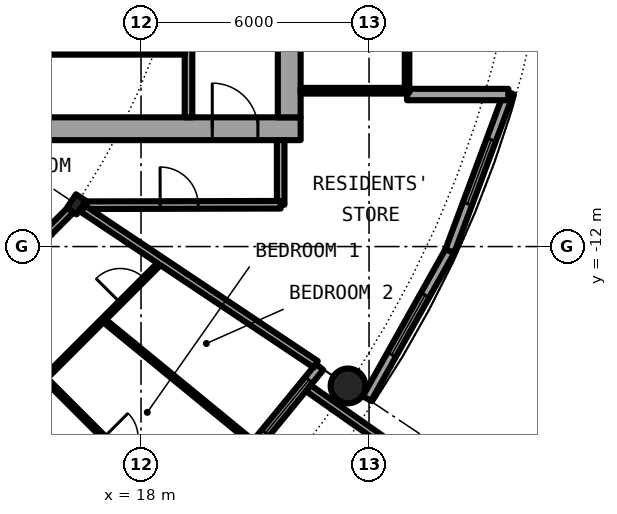
"""IFC4 building model, lengths in metres.
Left out: names, types, materials, properties, quantities, classifications, styles, units other than length and angle.
Written with IfcOpenShell. Run it as: python <this file> out.ifc"""

import sys

from ifc_helpers import new_model, si_unit, direction, frame, frame_2d, origin, origin_2d, place, context, subcontext, project, spatial, rectangle, hollow_circle, i_section, extrude, element, fill, save


model = new_model("IFC4")
c1 = context("Model", 3, precision=1e-05, world=origin(), true_north=direction((0.0, 1.0)))
c2 = subcontext(c1, "Body", "Model", "MODEL_VIEW")
j1 = project(units=[si_unit("LENGTHUNIT", "METRE"), si_unit("PLANEANGLEUNIT", "RADIAN")], contexts=[c1])
p1 = place(None, origin())
s1 = spatial("IfcSite", under=j1, at=p1, CompositionType="ELEMENT")
p2 = place(p1, origin())
s2 = spatial("IfcBuilding", under=s1, at=p2, CompositionType="ELEMENT")
p3 = place(p2, frame((0.0, 0.0, 123.85)))
s3 = spatial("IfcBuildingStorey", under=s2, at=p3, CompositionType="ELEMENT", Elevation=123.85)
p4 = place(p3, frame((23.448, -15.667, 0.0), z_axis=(0.0, 0.0, 1.0), x_axis=(1.0, 0.0, 0.0)))
e1 = element("IfcColumn", 1, at=p4, inside=s3, PredefinedType="COLUMN", context=c2, shape_type="SweptSolid", body=[
    extrude(hollow_circle(Radius=0.457, WallThickness=0.04, at=origin_2d()), origin(), (0.0, 0.0, 1.0), 3.05),
])
p5 = place(p3, frame((16.297, -10.889, 0.0), z_axis=(0.0, 0.0, 1.0), x_axis=(0.831469612303, -0.55557023302, 0.0)))
e2 = element("IfcColumn", 2, at=p5, inside=s3, PredefinedType="COLUMN", context=c2, shape_type="SweptSolid", body=[
    extrude(i_section(OverallWidth=0.307, OverallDepth=0.432, WebThickness=0.021, FlangeThickness=0.04, FilletRadius=0.027, at=origin_2d()), origin(), (0.0, 0.0, 1.0), 3.05),
])
p6 = place(p3, frame((19.304, -19.304, 0.0), z_axis=(0.0, 0.0, 1.0), x_axis=(0.634382322723, 0.773019449054, 0.0)))
e3 = element("IfcWall", 3, at=p6, inside=s3, PredefinedType="SOLIDWALL", context=c2, shape_type="SweptSolid", body=[
    extrude(rectangle(XDim=5.352, YDim=0.25, at=frame_2d((2.676, 0.0))), origin(), (0.0, 0.0, 1.0), 2.7),
])
p7 = place(p6, frame((0.841, 0.0, 0.0)))
e4 = element("IfcOpeningElement", 4, at=p7, cuts=e3, PredefinedType="OPENING", context=c2, shape_type="SweptSolid", body=[
    extrude(rectangle(XDim=1.0, YDim=2.2, at=frame_2d((0.5, 1.1))), frame((0.0, 0.135, 0.0), z_axis=(0.0, -1.0, 0.0), x_axis=(1.0, 0.0, 0.0)), (0.0, 0.0, 1.0), 0.27),
])
p8 = place(p6, frame((3.111, 0.0, 0.3)))
e5 = element("IfcOpeningElement", 5, at=p8, cuts=e3, PredefinedType="OPENING", context=c2, shape_type="SweptSolid", body=[
    extrude(rectangle(XDim=1.8, YDim=2.1, at=frame_2d((0.9, 1.05))), frame((0.0, 0.135, 0.0), z_axis=(0.0, -1.0, 0.0), x_axis=(1.0, 0.0, 0.0)), (0.0, 0.0, 1.0), 0.27),
])
p9 = place(p3, frame((22.402, -15.726, -0.03), z_axis=(0.0, 0.0, 1.0), x_axis=(0.818275399393, -0.574826383135, 0.0)))
e6 = element("IfcWall", 6, at=p9, inside=s3, PredefinedType="SOLIDWALL", context=c2, shape_type="SweptSolid", body=[
    extrude(rectangle(XDim=2.929, YDim=0.2, at=frame_2d((1.465, 0.0))), origin(), (0.0, 0.0, 1.0), 2.73),
])
p10 = place(p3, frame((23.946, -16.0, 0.0), z_axis=(0.0, 0.0, 1.0), x_axis=(0.489696356642, 0.871893042919, 0.0)))
e7 = element("IfcWall", 7, at=p10, inside=s3, PredefinedType="SOLIDWALL", context=c2, shape_type="SweptSolid", body=[
    extrude(rectangle(XDim=4.454, YDim=0.25, at=frame_2d((2.227, 0.0))), origin(), (0.0, 0.0, 1.0), 2.7),
])
p11 = place(p10, frame((1.327, 0.0, 0.3)))
e8 = element("IfcOpeningElement", 8, at=p11, cuts=e7, PredefinedType="OPENING", context=c2, shape_type="SweptSolid", body=[
    extrude(rectangle(XDim=1.8, YDim=2.1, at=frame_2d((0.9, 1.05))), frame((0.0, 0.135, 0.0), z_axis=(0.0, -1.0, 0.0), x_axis=(1.0, 0.0, 0.0)), (0.0, 0.0, 1.0), 0.27),
])
p12 = place(p3, frame((26.127, -12.117, 0.0), z_axis=(0.0, 0.0, 1.0), x_axis=(0.349247811493, 0.937030397675, 0.0)))
e9 = element("IfcWall", 9, at=p12, inside=s3, PredefinedType="SOLIDWALL", context=c2, shape_type="SweptSolid", body=[
    extrude(rectangle(XDim=4.452, YDim=0.25, at=frame_2d((2.226, 0.0))), origin(), (0.0, 0.0, 1.0), 2.7),
])
p13 = place(p12, frame((1.327, 0.0, 0.3)))
e10 = element("IfcOpeningElement", 10, at=p13, cuts=e9, PredefinedType="OPENING", context=c2, shape_type="SweptSolid", body=[
    extrude(rectangle(XDim=1.8, YDim=2.1, at=frame_2d((0.9, 1.05))), frame((0.0, 0.135, 0.0), z_axis=(0.0, -1.0, 0.0), x_axis=(1.0, 0.0, 0.0)), (0.0, 0.0, 1.0), 0.27),
])
p14 = place(p3, frame((25.0, -8.0, 0.0), z_axis=(0.0, 0.0, 1.0), x_axis=(1.0, 0.0, 0.0)))
e11 = element("IfcWall", 11, at=p14, inside=s3, PredefinedType="SOLIDWALL", context=c2, shape_type="SweptSolid", body=[
    extrude(rectangle(XDim=2.667, YDim=0.3, at=frame_2d((1.333, 0.0))), origin(), (0.0, 0.0, 1.0), 2.7),
])
p15 = place(p3, frame((8.4, -8.9, 0.0), z_axis=(0.0, 0.0, 1.0), x_axis=(1.0, 0.0, 0.0)))
e12 = element("IfcWall", 12, at=p15, inside=s3, PredefinedType="SHEAR", context=c2, shape_type="SweptSolid", body=[
    extrude(rectangle(XDim=13.8, YDim=0.6, at=frame_2d((6.9, 0.0))), origin(), (0.0, 0.0, 1.0), 3.05),
])
p16 = place(p15, frame((11.475, 0.0, 0.0)))
e13 = element("IfcOpeningElement", 13, at=p16, cuts=e12, PredefinedType="OPENING", context=c2, shape_type="SweptSolid", body=[
    extrude(rectangle(XDim=1.2, YDim=2.3, at=frame_2d((0.6, 1.15))), frame((0.0, 0.31, 0.0), z_axis=(0.0, -1.0, 0.0), x_axis=(1.0, 0.0, 0.0)), (0.0, 0.0, 1.0), 0.62),
])
p17 = place(p3, frame((21.9, 8.6, 0.0), z_axis=(0.0, 0.0, 1.0), x_axis=(0.0, -1.0, 0.0)))
e14 = element("IfcWall", 14, at=p17, inside=s3, PredefinedType="SHEAR", context=c2, shape_type="SweptSolid", body=[
    extrude(rectangle(XDim=17.2, YDim=0.6, at=frame_2d((8.6, 0.0))), origin(), (0.0, 0.0, 1.0), 3.05),
])
p18 = place(p17, frame((7.7, 0.0, 0.0)))
e15 = element("IfcOpeningElement", 15, at=p18, cuts=e14, PredefinedType="OPENING", context=c2, shape_type="SweptSolid", body=[
    extrude(rectangle(XDim=1.8, YDim=2.3, at=frame_2d((0.9, 1.15))), frame((0.0, 0.31, 0.0), z_axis=(0.0, -1.0, 0.0), x_axis=(1.0, 0.0, 0.0)), (0.0, 0.0, 1.0), 0.62),
])
p19 = place(p3, frame((19.25, -8.6, 0.0), z_axis=(0.0, 0.0, 1.0), x_axis=(0.0, 1.0, 0.0)))
e16 = element("IfcWall", 16, at=p19, inside=s3, PredefinedType="SOLIDWALL", context=c2, shape_type="SweptSolid", body=[
    extrude(rectangle(XDim=7.025, YDim=0.2, at=frame_2d((3.513, 0.0))), origin(), (0.0, 0.0, 1.0), 2.7),
])
p20 = place(p19, frame((2.35, 0.0, 0.0)))
e17 = element("IfcOpeningElement", 17, at=p20, cuts=e16, PredefinedType="OPENING", context=c2, shape_type="SweptSolid", body=[
    extrude(rectangle(XDim=1.1, YDim=2.3, at=frame_2d((0.55, 1.15))), frame((0.0, 0.11, 0.0), z_axis=(0.0, -1.0, 0.0), x_axis=(1.0, 0.0, 0.0)), (0.0, 0.0, 1.0), 0.22),
])
p21 = place(p3, frame((15.45, -6.875, 0.0), z_axis=(0.0, 0.0, 1.0), x_axis=(1.0, 0.0, 0.0)))
e18 = element("IfcWall", 18, at=p21, inside=s3, PredefinedType="PARTITIONING", context=c2, shape_type="SweptSolid", body=[
    extrude(rectangle(XDim=3.7, YDim=0.15, at=frame_2d((1.85, 0.0))), origin(), (0.0, 0.0, 1.0), 2.7),
])
p22 = place(p21, frame((1.4, 0.0, 0.0)))
e19 = element("IfcOpeningElement", 19, at=p22, cuts=e18, PredefinedType="OPENING", context=c2, shape_type="SweptSolid", body=[
    extrude(rectangle(XDim=0.9, YDim=2.3, at=frame_2d((0.45, 1.15))), frame((0.0, 0.085, 0.0), z_axis=(0.0, -1.0, 0.0), x_axis=(1.0, 0.0, 0.0)), (0.0, 0.0, 1.0), 0.17),
])
p23 = place(p3, frame((22.2, -7.9, 0.0), z_axis=(0.0, 0.0, 1.0), x_axis=(1.0, 0.0, 0.0)))
e20 = element("IfcWall", 20, at=p23, inside=s3, PredefinedType="PARTITIONING", context=c2, shape_type="SweptSolid", body=[
    extrude(rectangle(XDim=2.74, YDim=0.15, at=frame_2d((1.37, 0.0))), origin(), (0.0, 0.0, 1.0), 2.7),
])
p24 = place(p3, frame((25.0, -7.95, 0.0), z_axis=(0.0, 0.0, 1.0), x_axis=(0.0, 1.0, 0.0)))
e21 = element("IfcWall", 21, at=p24, inside=s3, PredefinedType="PARTITIONING", context=c2, shape_type="SweptSolid", body=[
    extrude(rectangle(XDim=15.9, YDim=0.12, at=frame_2d((7.95, 0.0))), origin(), (0.0, 0.0, 1.0), 2.7),
])
p25 = place(p24, frame((0.95, 0.0, 0.1)))
e22 = element("IfcOpeningElement", 22, at=p25, cuts=e21, PredefinedType="OPENING", context=c2, shape_type="SweptSolid", body=[
    extrude(rectangle(XDim=14.0, YDim=2.35, at=frame_2d((7.0, 1.175))), frame((0.0, 0.07, 0.0), z_axis=(0.0, -1.0, 0.0), x_axis=(1.0, 0.0, 0.0)), (0.0, 0.0, 1.0), 0.14),
])
p26 = place(p3, frame((15.468, -15.463, 0.0), z_axis=(0.0, 0.0, 1.0), x_axis=(0.707106781187, 0.707106781187, 0.0)))
e23 = element("IfcWall", 23, at=p26, inside=s3, PredefinedType="PARTITIONING", context=c2, shape_type="SweptSolid", body=[
    extrude(rectangle(XDim=4.351, YDim=0.1, at=frame_2d((2.176, 0.0))), origin(), (0.0, 0.0, 1.0), 2.7),
])
p27 = place(p26, frame((2.808, 0.0, 0.0)))
e24 = element("IfcOpeningElement", 24, at=p27, cuts=e23, PredefinedType="OPENING", context=c2, shape_type="SweptSolid", body=[
    extrude(rectangle(XDim=0.9, YDim=2.3, at=frame_2d((0.45, 1.15))), frame((0.0, 0.06, 0.0), z_axis=(0.0, -1.0, 0.0), x_axis=(1.0, 0.0, 0.0)), (0.0, 0.0, 1.0), 0.12),
])
p28 = place(p3, frame((21.675, -10.9, 0.0), z_axis=(0.0, 0.0, 1.0), x_axis=(0.0, 1.0, 0.0)))
e25 = element("IfcWall", 25, at=p28, inside=s3, PredefinedType="PARTITIONING", context=c2, shape_type="SweptSolid", body=[
    extrude(rectangle(XDim=1.7, YDim=0.2, at=frame_2d((0.85, 0.0))), origin(), (0.0, 0.0, 1.0), 2.7),
])
p29 = place(p3, frame((11.0, -16.186, 0.0), z_axis=(0.0, 0.0, 1.0), x_axis=(0.707106781187, 0.707106781187, 0.0)))
e26 = element("IfcWall", 26, at=p29, inside=s3, PredefinedType="PARTITIONING", context=c2, shape_type="SweptSolid", body=[
    extrude(rectangle(XDim=7.334, YDim=0.2, at=frame_2d((3.667, 0.0))), origin(), (0.0, 0.0, 1.0), 2.39),
])
p30 = place(p29, frame((4.123, 0.0, 0.0)))
e27 = element("IfcOpeningElement", 27, at=p30, cuts=e26, PredefinedType="OPENING", context=c2, shape_type="SweptSolid", body=[
    extrude(rectangle(XDim=1.0, YDim=2.3, at=frame_2d((0.5, 1.15))), frame((0.0, 0.11, 0.0), z_axis=(0.0, -1.0, 0.0), x_axis=(1.0, 0.0, 0.0)), (0.0, 0.0, 1.0), 0.22),
])
p31 = place(p3, frame((16.541, -10.912, 0.0), z_axis=(0.0, 0.0, 1.0), x_axis=(0.999997173357, 0.002377662213, 0.0)))
e28 = element("IfcWall", 28, at=p31, inside=s3, PredefinedType="PARTITIONING", context=c2, shape_type="SweptSolid", body=[
    extrude(rectangle(XDim=5.134, YDim=0.2, at=frame_2d((2.567, 0.0))), origin(), (0.0, 0.0, 1.0), 2.7),
])
p32 = place(p31, frame((1.963, 0.0, 0.0)))
e29 = element("IfcOpeningElement", 29, at=p32, cuts=e28, PredefinedType="OPENING", context=c2, shape_type="SweptSolid", body=[
    extrude(rectangle(XDim=1.0, YDim=2.3, at=frame_2d((0.5, 1.15))), frame((0.0, 0.11, 0.0), z_axis=(0.0, -1.0, 0.0), x_axis=(1.0, 0.0, 0.0)), (0.0, 0.0, 1.0), 0.22),
])
p33 = place(p3, frame((15.465, -15.465, 0.0), z_axis=(0.0, 0.0, 1.0), x_axis=(0.707106781187, -0.707106781187, 0.0)))
e30 = element("IfcWall", 30, at=p33, inside=s3, PredefinedType="PARTITIONING", context=c2, shape_type="SweptSolid", body=[
    extrude(rectangle(XDim=5.305, YDim=0.1, at=frame_2d((2.652, 0.0))), origin(), (0.0, 0.0, 1.0), 2.7),
])
p34 = place(p33, frame((2.202, 0.0, 0.0)))
e31 = element("IfcOpeningElement", 31, at=p34, cuts=e30, PredefinedType="OPENING", context=c2, shape_type="SweptSolid", body=[
    extrude(rectangle(XDim=0.9, YDim=2.3, at=frame_2d((0.45, 1.15))), frame((0.0, 0.06, 0.0), z_axis=(0.0, -1.0, 0.0), x_axis=(1.0, 0.0, 0.0)), (0.0, 0.0, 1.0), 0.12),
])
p35 = place(p3, frame((16.477, -11.009, 0.0), z_axis=(0.0, 0.0, 1.0), x_axis=(0.831467903109, -0.555572791, 0.0)))
e32 = element("IfcWall", 32, at=p35, inside=s3, PredefinedType="PARTITIONING", context=c2, shape_type="SweptSolid", body=[
    extrude(rectangle(XDim=7.358, YDim=0.2, at=frame_2d((3.679, 0.0))), origin(), (0.0, 0.0, 1.0), 2.7),
])
p36 = place(p3, frame((17.004, -13.927, 0.0), z_axis=(0.0, 0.0, 1.0), x_axis=(0.773517471898, -0.633774976367, 0.0)))
e33 = element("IfcWall", 33, at=p36, inside=s3, PredefinedType="PARTITIONING", context=c2, shape_type="SweptSolid", body=[
    extrude(rectangle(XDim=5.196, YDim=0.1, at=frame_2d((2.598, 0.0))), origin(), (0.0, 0.0, 1.0), 2.7),
])
p37 = place(p8, origin())
e34 = element("IfcWindow", 34, at=p37, inside=s3, PartitioningType="SINGLE_PANEL", PredefinedType="WINDOW", context=c2, shape_type="SweptSolid", body=[
    extrude(rectangle(XDim=1.8, YDim=2.1, at=frame_2d((0.9, 1.05))), frame((0.0, 0.03, 0.0), z_axis=(0.0, -1.0, 0.0), x_axis=(1.0, 0.0, 0.0)), (0.0, 0.0, 1.0), 0.06),
])
fill(e5, e34)
p38 = place(p11, origin())
e35 = element("IfcWindow", 35, at=p38, inside=s3, PartitioningType="SINGLE_PANEL", PredefinedType="WINDOW", context=c2, shape_type="SweptSolid", body=[
    extrude(rectangle(XDim=1.8, YDim=2.1, at=frame_2d((0.9, 1.05))), frame((0.0, 0.03, 0.0), z_axis=(0.0, -1.0, 0.0), x_axis=(1.0, 0.0, 0.0)), (0.0, 0.0, 1.0), 0.06),
])
fill(e8, e35)
p39 = place(p13, origin())
e36 = element("IfcWindow", 36, at=p39, inside=s3, PartitioningType="SINGLE_PANEL", PredefinedType="WINDOW", context=c2, shape_type="SweptSolid", body=[
    extrude(rectangle(XDim=1.8, YDim=2.1, at=frame_2d((0.9, 1.05))), frame((0.0, 0.03, 0.0), z_axis=(0.0, -1.0, 0.0), x_axis=(1.0, 0.0, 0.0)), (0.0, 0.0, 1.0), 0.06),
])
fill(e10, e36)
p40 = place(p22, origin())
e37 = element("IfcDoor", 37, at=p40, inside=s3, OperationType="SINGLE_SWING_LEFT", PredefinedType="DOOR", context=c2, shape_type="SweptSolid", body=[
    extrude(rectangle(XDim=0.9, YDim=2.3, at=frame_2d((0.45, 1.15))), frame((0.0, 0.025, 0.0), z_axis=(0.0, -1.0, 0.0), x_axis=(1.0, 0.0, 0.0)), (0.0, 0.0, 1.0), 0.05),
])
fill(e19, e37)
p41 = place(p16, origin())
e38 = element("IfcDoor", 38, at=p41, inside=s3, OperationType="SINGLE_SWING_LEFT", PredefinedType="DOOR", context=c2, shape_type="SweptSolid", body=[
    extrude(rectangle(XDim=1.2, YDim=2.3, at=frame_2d((0.6, 1.15))), frame((0.0, 0.025, 0.0), z_axis=(0.0, -1.0, 0.0), x_axis=(1.0, 0.0, 0.0)), (0.0, 0.0, 1.0), 0.05),
])
fill(e13, e38)
p42 = place(p25, origin())
e39 = element("IfcWindow", 39, at=p42, inside=s3, PartitioningType="SINGLE_PANEL", PredefinedType="WINDOW", context=c2, shape_type="SweptSolid", body=[
    extrude(rectangle(XDim=14.0, YDim=2.35, at=frame_2d((7.0, 1.175))), frame((0.0, 0.03, 0.0), z_axis=(0.0, -1.0, 0.0), x_axis=(1.0, 0.0, 0.0)), (0.0, 0.0, 1.0), 0.06),
])
fill(e22, e39)
p43 = place(p27, origin())
e40 = element("IfcDoor", 40, at=p43, inside=s3, OperationType="SINGLE_SWING_RIGHT", PredefinedType="DOOR", context=c2, shape_type="SweptSolid", body=[
    extrude(rectangle(XDim=0.9, YDim=2.3, at=frame_2d((0.45, 1.15))), frame((0.0, 0.025, 0.0), z_axis=(0.0, -1.0, 0.0), x_axis=(1.0, 0.0, 0.0)), (0.0, 0.0, 1.0), 0.05),
])
fill(e24, e40)
p44 = place(p32, origin())
e41 = element("IfcDoor", 41, at=p44, inside=s3, OperationType="SINGLE_SWING_LEFT", PredefinedType="DOOR", context=c2, shape_type="SweptSolid", body=[
    extrude(rectangle(XDim=1.0, YDim=2.3, at=frame_2d((0.5, 1.15))), frame((0.0, 0.025, 0.0), z_axis=(0.0, -1.0, 0.0), x_axis=(1.0, 0.0, 0.0)), (0.0, 0.0, 1.0), 0.05),
])
fill(e29, e41)
save(model, sys.argv[1])
